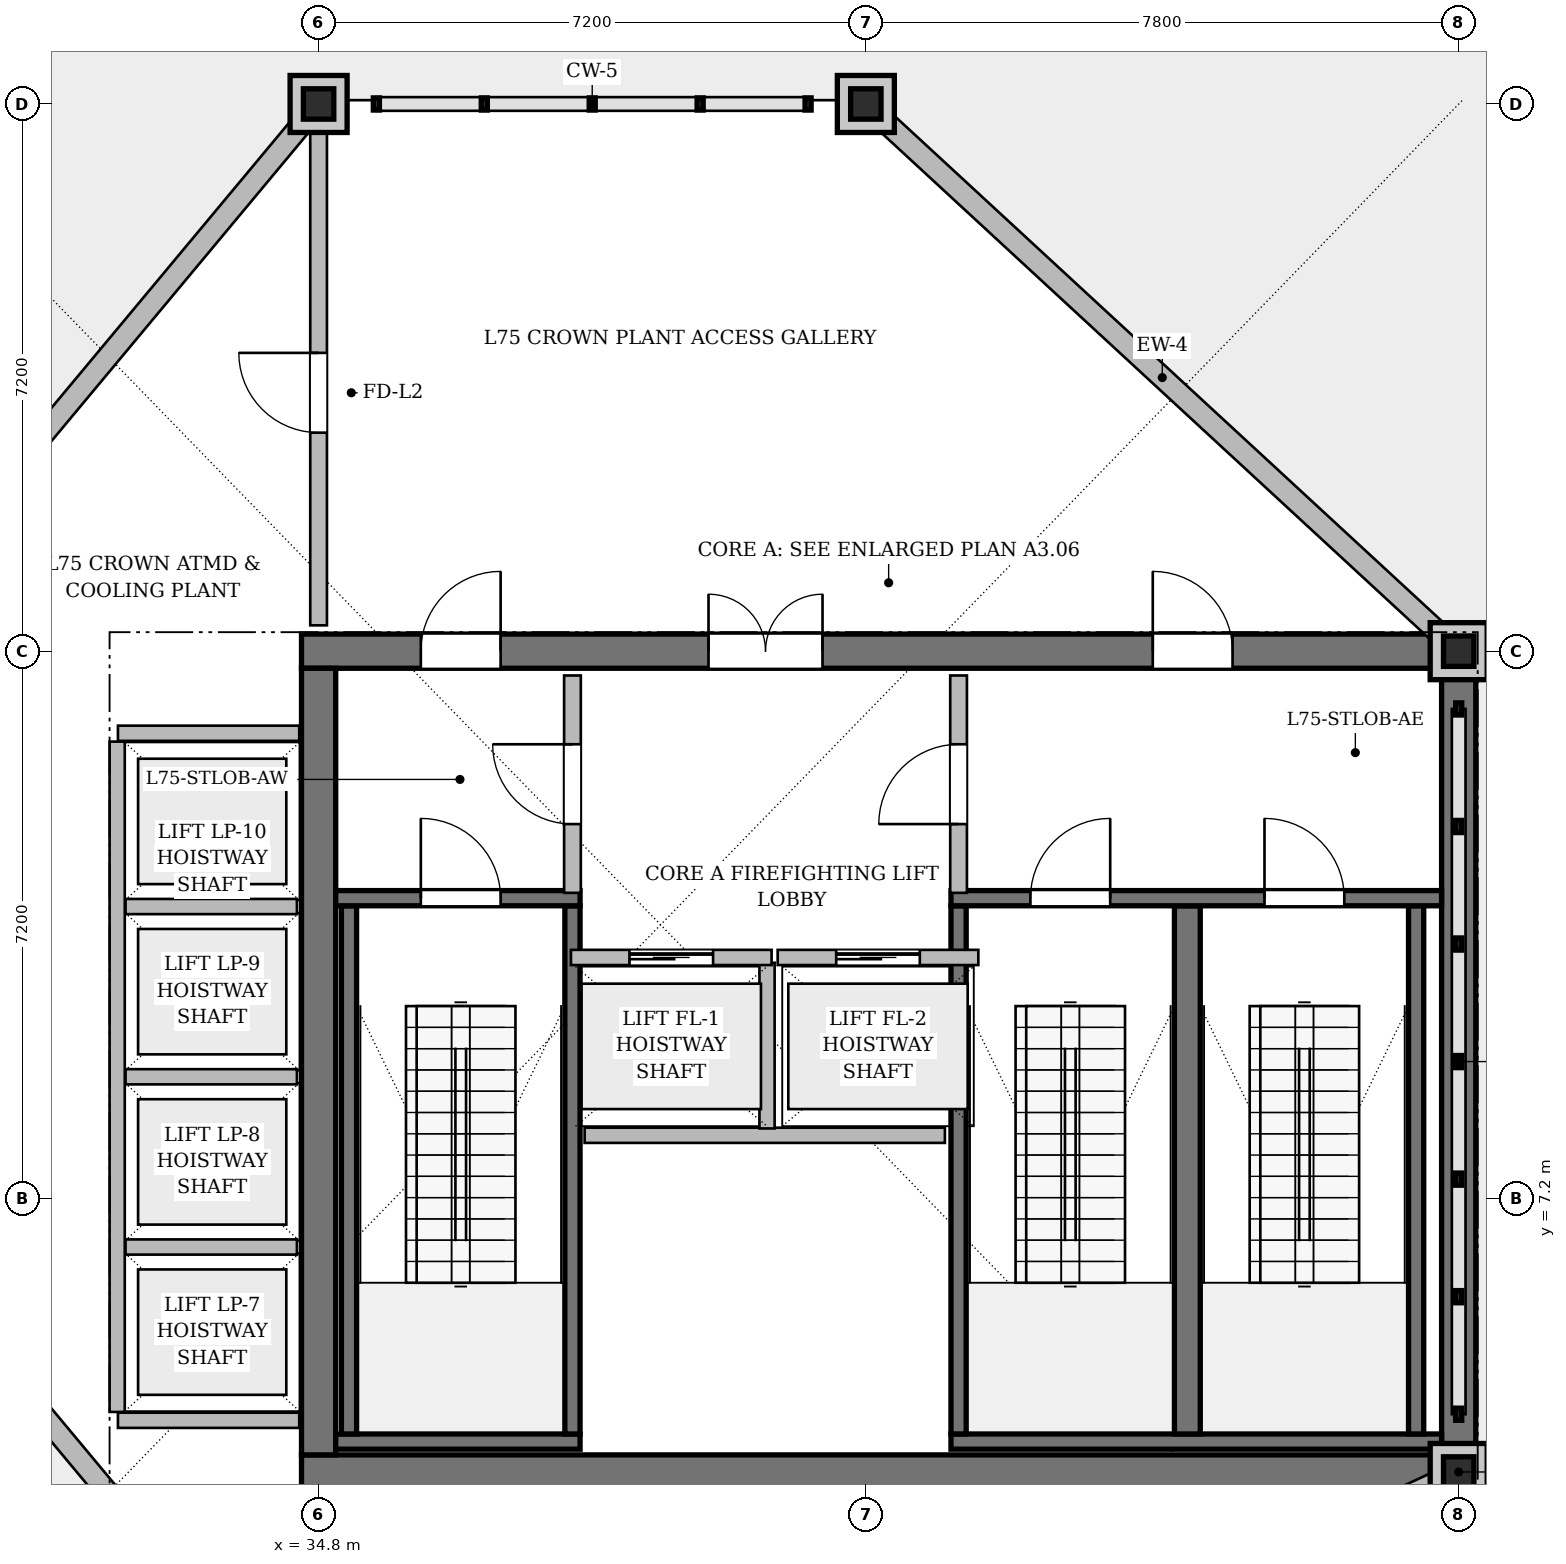
"""IFC4 building model, lengths in metres.
Left out: names, types, materials, properties, quantities, classifications, styles, units other than length and angle.
Written with IfcOpenShell. Run it as: python <this file> out.ifc"""

import sys

from ifc_helpers import new_model, si_unit, direction, frame, frame_2d, origin, origin_2d, place, context, subcontext, project, spatial, rectangle, hollow_rectangle, extrude, source, transform, mapped, element, fill, save


model = new_model("IFC4")
c1 = context("Model", 3, precision=1e-05, world=origin(), true_north=direction((0.0, 1.0)))
c2 = subcontext(c1, "Body", "Model", "MODEL_VIEW")
j1 = project(units=[si_unit("LENGTHUNIT", "METRE"), si_unit("PLANEANGLEUNIT", "RADIAN")], contexts=[c1])
p1 = place(None, origin())
s1 = spatial("IfcSite", under=j1, at=p1, CompositionType="ELEMENT")
p2 = place(p1, origin())
s2 = spatial("IfcBuilding", under=s1, at=p2, CompositionType="ELEMENT")
p3 = place(p2, frame((0.0, 0.0, 299.1)))
s3 = spatial("IfcBuildingStorey", under=s2, at=p3, CompositionType="ELEMENT", Elevation=299.1)
p4 = place(p3, frame((34.575, 3.6, 0.0), z_axis=(0.0, 0.0, 1.0), x_axis=(1.0, 0.0, 0.0)))
e1 = element("IfcWall", 1, at=p4, inside=s3, PredefinedType="SHEAR", context=c2, shape_type="SweptSolid", body=[
    extrude(rectangle(XDim=15.45, YDim=0.45, at=frame_2d((7.725, 0.0))), origin(), (0.0, 0.0, 1.0), 4.8),
])
p5 = place(p3, frame((34.575, 14.4, 0.0), z_axis=(0.0, 0.0, 1.0), x_axis=(1.0, 0.0, 0.0)))
e2 = element("IfcWall", 2, at=p5, inside=s3, PredefinedType="SHEAR", context=c2, shape_type="SweptSolid", body=[
    extrude(rectangle(XDim=15.45, YDim=0.45, at=frame_2d((7.725, 0.0))), origin(), (0.0, 0.0, 1.0), 4.8),
])
p6 = place(p5, frame((5.355, 0.0, 0.0)))
e3 = element("IfcOpeningElement", 3, at=p6, cuts=e2, PredefinedType="OPENING", context=c2, shape_type="SweptSolid", body=[
    extrude(rectangle(XDim=1.5, YDim=2.2, at=frame_2d((0.75, 1.1))), frame((0.0, 0.235, 0.0), z_axis=(0.0, -1.0, 0.0), x_axis=(1.0, 0.0, 0.0)), (0.0, 0.0, 1.0), 0.47),
])
p7 = place(p5, frame((1.57, 0.0, 0.0)))
e4 = element("IfcOpeningElement", 4, at=p7, cuts=e2, PredefinedType="OPENING", context=c2, shape_type="SweptSolid", body=[
    extrude(rectangle(XDim=1.05, YDim=2.15, at=frame_2d((0.525, 1.075))), frame((0.0, 0.235, 0.0), z_axis=(0.0, -1.0, 0.0), x_axis=(1.0, 0.0, 0.0)), (0.0, 0.0, 1.0), 0.47),
])
p8 = place(p5, frame((11.2, 0.0, 0.0)))
e5 = element("IfcOpeningElement", 5, at=p8, cuts=e2, PredefinedType="OPENING", context=c2, shape_type="SweptSolid", body=[
    extrude(rectangle(XDim=1.05, YDim=2.15, at=frame_2d((0.525, 1.075))), frame((0.0, 0.235, 0.0), z_axis=(0.0, -1.0, 0.0), x_axis=(1.0, 0.0, 0.0)), (0.0, 0.0, 1.0), 0.47),
])
for number, where, z_axis, x_axis in (
    (6, (34.8, 3.825, 0.0), (0.0, 0.0, 1.0), (0.0, 1.0, 0.0)),
    (7, (49.8, 3.825, 0.0), (0.0, 0.0, 1.0), (0.0, 1.0, 0.0)),
):
    element("IfcWall", number, at=place(p3, frame(where, z_axis=z_axis, x_axis=x_axis)), inside=s3, PredefinedType="SHEAR", context=c2, shape_type="SweptSolid", body=[
        extrude(rectangle(XDim=10.35, YDim=0.45, at=frame_2d((5.175, 0.0))), origin(), (0.0, 0.0, 1.0), 4.8),
    ])
m1 = source(origin(), c2, "Body", "SweptSolid", [
    extrude(hollow_rectangle(XDim=0.4, YDim=0.4, WallThickness=0.02, at=origin_2d()), origin(), (0.0, 0.0, 1.0), 4.8),
])
for number, where, z_axis, x_axis in (
    (8, (49.8, 3.6, 0.0), (0.0, 0.0, 1.0), (1.0, 0.0, 0.0)),
    (9, (49.8, 14.4, 0.0), (0.0, 0.0, 1.0), (1.0, 0.0, 0.0)),
    (10, (42.0, 21.6, 0.0), (0.0, 0.0, 1.0), (1.0, 0.0, 0.0)),
    (11, (34.8, 21.6, 0.0), (0.0, 0.0, 1.0), (1.0, 0.0, 0.0)),
):
    element("IfcColumn", number, at=place(p3, frame(where, z_axis=z_axis, x_axis=x_axis)), inside=s3, PredefinedType="COLUMN", context=c2, shape_type="MappedRepresentation", body=[
        mapped(m1, transform((0.0, 0.0, 0.0), scale=1.0)),
    ])
p9 = place(p3, frame((35.025, 4.0, 0.0), z_axis=(0.0, 0.0, 1.0), x_axis=(1.0, 0.0, 0.0)))
e12 = element("IfcWall", 12, at=p9, inside=s3, PredefinedType="SHEAR", context=c2, shape_type="SweptSolid", body=[
    extrude(rectangle(XDim=3.215, YDim=0.2, at=frame_2d((1.607, 0.0))), origin(), (0.0, 0.0, 1.0), 4.8),
])
for number, where, z_axis, x_axis in (
    (13, (35.2, 4.1, 0.0), (0.0, 0.0, 1.0), (0.0, 1.0, 0.0)),
    (14, (38.14, 4.1, 0.0), (0.0, 0.0, 1.0), (0.0, 1.0, 0.0)),
):
    element("IfcWall", number, at=place(p3, frame(where, z_axis=z_axis, x_axis=x_axis)), inside=s3, PredefinedType="SHEAR", context=c2, shape_type="SweptSolid", body=[
        extrude(rectangle(XDim=6.95, YDim=0.2, at=frame_2d((3.475, 0.0))), origin(), (0.0, 0.0, 1.0), 4.8),
    ])
p10 = place(p3, frame((35.025, 11.15, 0.0), z_axis=(0.0, 0.0, 1.0), x_axis=(1.0, 0.0, 0.0)))
e15 = element("IfcWall", 15, at=p10, inside=s3, PredefinedType="SHEAR", context=c2, shape_type="SweptSolid", body=[
    extrude(rectangle(XDim=3.215, YDim=0.2, at=frame_2d((1.607, 0.0))), origin(), (0.0, 0.0, 1.0), 4.8),
])
p11 = place(p10, frame((1.12, 0.0, 0.0)))
e16 = element("IfcOpeningElement", 16, at=p11, cuts=e15, PredefinedType="OPENING", context=c2, shape_type="SweptSolid", body=[
    extrude(rectangle(XDim=1.05, YDim=2.2, at=frame_2d((0.525, 1.1))), frame((0.0, 0.11, 0.0), z_axis=(0.0, -1.0, 0.0), x_axis=(1.0, 0.0, 0.0)), (0.0, 0.0, 1.0), 0.22),
])
p12 = place(p3, frame((43.12, 4.0, 0.0), z_axis=(0.0, 0.0, 1.0), x_axis=(1.0, 0.0, 0.0)))
e17 = element("IfcWall", 17, at=p12, inside=s3, PredefinedType="SHEAR", context=c2, shape_type="SweptSolid", body=[
    extrude(rectangle(XDim=6.455, YDim=0.2, at=frame_2d((3.228, 0.0))), origin(), (0.0, 0.0, 1.0), 4.8),
])
p13 = place(p3, frame((43.22, 4.1, 0.0), z_axis=(0.0, 0.0, 1.0), x_axis=(0.0, 1.0, 0.0)))
e18 = element("IfcWall", 18, at=p13, inside=s3, PredefinedType="SHEAR", context=c2, shape_type="SweptSolid", body=[
    extrude(rectangle(XDim=6.95, YDim=0.2, at=frame_2d((3.475, 0.0))), origin(), (0.0, 0.0, 1.0), 4.8),
])
p14 = place(p3, frame((46.23, 4.1, 0.0), z_axis=(0.0, 0.0, 1.0), x_axis=(0.0, 1.0, 0.0)))
e19 = element("IfcWall", 19, at=p14, inside=s3, PredefinedType="SHEAR", context=c2, shape_type="SweptSolid", body=[
    extrude(rectangle(XDim=6.95, YDim=0.34, at=frame_2d((3.475, 0.0))), origin(), (0.0, 0.0, 1.0), 4.8),
])
p15 = place(p3, frame((49.24, 4.1, 0.0), z_axis=(0.0, 0.0, 1.0), x_axis=(0.0, 1.0, 0.0)))
e20 = element("IfcWall", 20, at=p15, inside=s3, PredefinedType="SHEAR", context=c2, shape_type="SweptSolid", body=[
    extrude(rectangle(XDim=6.95, YDim=0.2, at=frame_2d((3.475, 0.0))), origin(), (0.0, 0.0, 1.0), 4.8),
])
p16 = place(p3, frame((43.12, 11.15, 0.0), z_axis=(0.0, 0.0, 1.0), x_axis=(1.0, 0.0, 0.0)))
e21 = element("IfcWall", 21, at=p16, inside=s3, PredefinedType="SHEAR", context=c2, shape_type="SweptSolid", body=[
    extrude(rectangle(XDim=6.455, YDim=0.2, at=frame_2d((3.228, 0.0))), origin(), (0.0, 0.0, 1.0), 4.8),
])
p17 = place(p16, frame((1.045, 0.0, 0.0)))
e22 = element("IfcOpeningElement", 22, at=p17, cuts=e21, PredefinedType="OPENING", context=c2, shape_type="SweptSolid", body=[
    extrude(rectangle(XDim=1.05, YDim=2.2, at=frame_2d((0.525, 1.1))), frame((0.0, 0.11, 0.0), z_axis=(0.0, -1.0, 0.0), x_axis=(1.0, 0.0, 0.0)), (0.0, 0.0, 1.0), 0.22),
])
p18 = place(p16, frame((4.125, 0.0, 0.0)))
e23 = element("IfcOpeningElement", 23, at=p18, cuts=e21, PredefinedType="OPENING", context=c2, shape_type="SweptSolid", body=[
    extrude(rectangle(XDim=1.05, YDim=2.2, at=frame_2d((0.525, 1.1))), frame((0.0, 0.11, 0.0), z_axis=(0.0, -1.0, 0.0), x_axis=(1.0, 0.0, 0.0)), (0.0, 0.0, 1.0), 0.22),
])
p19 = place(p3, frame((38.3, 8.03, 0.0), z_axis=(0.0, 0.0, 1.0), x_axis=(1.0, 0.0, 0.0)))
e24 = element("IfcWall", 24, at=p19, inside=s3, PredefinedType="PARTITIONING", context=c2, shape_type="SweptSolid", body=[
    extrude(rectangle(XDim=4.74, YDim=0.2, at=frame_2d((2.37, 0.0))), origin(), (0.0, 0.0, 1.0), 4.5),
])
p20 = place(p3, frame((40.7, 8.12, 0.0), z_axis=(0.0, 0.0, 1.0), x_axis=(0.0, 1.0, 0.0)))
e25 = element("IfcWall", 25, at=p20, inside=s3, PredefinedType="PARTITIONING", context=c2, shape_type="SweptSolid", body=[
    extrude(rectangle(XDim=2.18, YDim=0.2, at=frame_2d((1.09, 0.0))), origin(), (0.0, 0.0, 1.0), 4.5),
])
p21 = place(p3, frame((38.14, 11.22, 0.0), z_axis=(0.0, 0.0, 1.0), x_axis=(0.0, 1.0, 0.0)))
e26 = element("IfcWall", 26, at=p21, inside=s3, PredefinedType="PARTITIONING", context=c2, shape_type="SweptSolid", body=[
    extrude(rectangle(XDim=2.86, YDim=0.22, at=frame_2d((1.43, 0.0))), origin(), (0.0, 0.0, 1.0), 4.5),
])
p22 = place(p21, frame((0.905, 0.0, 0.0)))
e27 = element("IfcOpeningElement", 27, at=p22, cuts=e26, PredefinedType="OPENING", context=c2, shape_type="SweptSolid", body=[
    extrude(rectangle(XDim=1.05, YDim=2.15, at=frame_2d((0.525, 1.075))), frame((0.0, 0.12, 0.0), z_axis=(0.0, -1.0, 0.0), x_axis=(1.0, 0.0, 0.0)), (0.0, 0.0, 1.0), 0.24),
])
p23 = place(p3, frame((43.22, 11.22, 0.0), z_axis=(0.0, 0.0, 1.0), x_axis=(0.0, 1.0, 0.0)))
e28 = element("IfcWall", 28, at=p23, inside=s3, PredefinedType="PARTITIONING", context=c2, shape_type="SweptSolid", body=[
    extrude(rectangle(XDim=2.86, YDim=0.22, at=frame_2d((1.43, 0.0))), origin(), (0.0, 0.0, 1.0), 4.5),
])
p24 = place(p23, frame((0.905, 0.0, 0.0)))
e29 = element("IfcOpeningElement", 29, at=p24, cuts=e28, PredefinedType="OPENING", context=c2, shape_type="SweptSolid", body=[
    extrude(rectangle(XDim=1.05, YDim=2.15, at=frame_2d((0.525, 1.075))), frame((0.0, 0.12, 0.0), z_axis=(0.0, -1.0, 0.0), x_axis=(1.0, 0.0, 0.0)), (0.0, 0.0, 1.0), 0.24),
])
for number, where, z_axis, x_axis in (
    (30, (32.16, 4.28, 0.0), (0.0, 0.0, 1.0), (1.0, 0.0, 0.0)),
    (31, (32.16, 13.32, 0.0), (0.0, 0.0, 1.0), (1.0, 0.0, 0.0)),
):
    element("IfcWall", number, at=place(p3, frame(where, z_axis=z_axis, x_axis=x_axis)), inside=s3, PredefinedType="PARTITIONING", context=c2, shape_type="SweptSolid", body=[
        extrude(rectangle(XDim=2.385, YDim=0.2, at=frame_2d((1.192, 0.0))), origin(), (0.0, 0.0, 1.0), 4.5),
    ])
p25 = place(p3, frame((32.15, 4.39, 0.0), z_axis=(0.0, 0.0, 1.0), x_axis=(0.0, 1.0, 0.0)))
e32 = element("IfcWall", 32, at=p25, inside=s3, PredefinedType="PARTITIONING", context=c2, shape_type="SweptSolid", body=[
    extrude(rectangle(XDim=8.82, YDim=0.2, at=frame_2d((4.41, 0.0))), origin(), (0.0, 0.0, 1.0), 4.5),
])
for number, where, z_axis, x_axis in (
    (33, (32.26, 6.56, 0.0), (0.0, 0.0, 1.0), (1.0, 0.0, 0.0)),
    (34, (32.26, 8.8, 0.0), (0.0, 0.0, 1.0), (1.0, 0.0, 0.0)),
    (35, (32.26, 11.04, 0.0), (0.0, 0.0, 1.0), (1.0, 0.0, 0.0)),
):
    element("IfcWall", number, at=place(p3, frame(where, z_axis=z_axis, x_axis=x_axis)), inside=s3, PredefinedType="PARTITIONING", context=c2, shape_type="SweptSolid", body=[
        extrude(rectangle(XDim=2.255, YDim=0.2, at=frame_2d((1.127, 0.0))), origin(), (0.0, 0.0, 1.0), 4.5),
    ])
p26 = place(p3, frame((34.8, 14.74, 0.0), z_axis=(0.0, 0.0, 1.0), x_axis=(0.0, 1.0, 0.0)))
e36 = element("IfcWall", 36, at=p26, inside=s3, PredefinedType="PARTITIONING", context=c2, shape_type="SweptSolid", body=[
    extrude(rectangle(XDim=6.72, YDim=0.22, at=frame_2d((3.36, 0.0))), origin(), (0.0, 0.0, 1.0), 4.035),
])
p27 = place(p26, frame((2.535, 0.0, 0.0)))
e37 = element("IfcOpeningElement", 37, at=p27, cuts=e36, PredefinedType="OPENING", context=c2, shape_type="SweptSolid", body=[
    extrude(rectangle(XDim=1.05, YDim=2.15, at=frame_2d((0.525, 1.075))), frame((0.0, 0.12, 0.0), z_axis=(0.0, -1.0, 0.0), x_axis=(1.0, 0.0, 0.0)), (0.0, 0.0, 1.0), 0.24),
])
p28 = place(p3, frame((38.12, 10.37, 0.0), z_axis=(0.0, 0.0, 1.0), x_axis=(1.0, 0.0, 0.0)))
e38 = element("IfcWall", 38, at=p28, inside=s3, PredefinedType="PARTITIONING", context=c2, shape_type="SweptSolid", body=[
    extrude(rectangle(XDim=2.64, YDim=0.2, at=frame_2d((1.32, 0.0))), origin(), (0.0, 0.0, 1.0), 4.5),
])
p29 = place(p28, frame((0.77, 0.0, 0.0)))
e39 = element("IfcOpeningElement", 39, at=p29, cuts=e38, PredefinedType="OPENING", context=c2, shape_type="SweptSolid", body=[
    extrude(rectangle(XDim=1.1, YDim=2.2, at=frame_2d((0.55, 1.1))), frame((0.0, 0.11, 0.0), z_axis=(0.0, -1.0, 0.0), x_axis=(1.0, 0.0, 0.0)), (0.0, 0.0, 1.0), 0.22),
])
p30 = place(p3, frame((40.84, 10.37, 0.0), z_axis=(0.0, 0.0, 1.0), x_axis=(1.0, 0.0, 0.0)))
e40 = element("IfcWall", 40, at=p30, inside=s3, PredefinedType="PARTITIONING", context=c2, shape_type="SweptSolid", body=[
    extrude(rectangle(XDim=2.64, YDim=0.2, at=frame_2d((1.32, 0.0))), origin(), (0.0, 0.0, 1.0), 4.5),
])
p31 = place(p30, frame((0.77, 0.0, 0.0)))
e41 = element("IfcOpeningElement", 41, at=p31, cuts=e40, PredefinedType="OPENING", context=c2, shape_type="SweptSolid", body=[
    extrude(rectangle(XDim=1.1, YDim=2.2, at=frame_2d((0.55, 1.1))), frame((0.0, 0.11, 0.0), z_axis=(0.0, -1.0, 0.0), x_axis=(1.0, 0.0, 0.0)), (0.0, 0.0, 1.0), 0.22),
])
p32 = place(p3, frame((42.0, 0.0, 0.0), z_axis=(0.0, 0.0, 1.0), x_axis=(0.907956057379, 0.41906538615, 0.0)))
e42 = element("IfcWall", 42, at=p32, inside=s3, PredefinedType="SOLIDWALL", context=c2, shape_type="SweptSolid", body=[
    extrude(rectangle(XDim=8.591, YDim=0.28, at=frame_2d((4.295, 0.0))), origin(), (0.0, 0.0, 1.0), 4.125),
])
p33 = place(p3, frame((49.8, 14.4, 0.0), z_axis=(0.0, 0.0, 1.0), x_axis=(-0.734796390569, 0.678287744551, 0.0)))
e43 = element("IfcWall", 43, at=p33, inside=s3, PredefinedType="SOLIDWALL", context=c2, shape_type="SweptSolid", body=[
    extrude(rectangle(XDim=10.615, YDim=0.28, at=frame_2d((5.308, 0.0))), origin(), (0.0, 0.0, 1.0), 4.125),
])
p34 = place(p3, frame((34.8, 21.6, 0.0), z_axis=(0.0, 0.0, 1.0), x_axis=(-0.640174150918, -0.768229820104, 0.0)))
e44 = element("IfcWall", 44, at=p34, inside=s3, PredefinedType="SOLIDWALL", context=c2, shape_type="SweptSolid", body=[
    extrude(rectangle(XDim=9.373, YDim=0.28, at=frame_2d((4.686, 0.0))), origin(), (0.0, 0.0, 1.0), 4.125),
])
p35 = place(p3, frame((28.8, 7.2, 0.0), z_axis=(0.0, 0.0, 1.0), x_axis=(0.640186961885, -0.768219144407, 0.0)))
e45 = element("IfcWall", 45, at=p35, inside=s3, PredefinedType="SOLIDWALL", context=c2, shape_type="SweptSolid", body=[
    extrude(rectangle(XDim=9.372, YDim=0.28, at=frame_2d((4.686, 0.0))), origin(), (0.0, 0.0, 1.0), 4.125),
])
m2 = source(origin(), c2, "Body", "SweptSolid", [
    extrude(rectangle(XDim=1.05, YDim=2.2, at=frame_2d((0.525, 1.1))), frame((0.0, 0.025, 0.0), z_axis=(0.0, -1.0, 0.0), x_axis=(1.0, 0.0, 0.0)), (0.0, 0.0, 1.0), 0.05),
])
p36 = place(p11, origin())
e46 = element("IfcDoor", 46, at=p36, inside=s3, OperationType="SINGLE_SWING_LEFT", PredefinedType="DOOR", context=c2, shape_type="MappedRepresentation", body=[
    mapped(m2, transform((0.0, 0.0, 0.0), scale=1.0)),
])
fill(e16, e46)
p37 = place(p17, origin())
e47 = element("IfcDoor", 47, at=p37, inside=s3, OperationType="SINGLE_SWING_RIGHT", PredefinedType="DOOR", context=c2, shape_type="MappedRepresentation", body=[
    mapped(m2, transform((0.0, 0.0, 0.0), scale=1.0)),
])
fill(e22, e47)
p38 = place(p18, origin())
e48 = element("IfcDoor", 48, at=p38, inside=s3, OperationType="SINGLE_SWING_LEFT", PredefinedType="DOOR", context=c2, shape_type="MappedRepresentation", body=[
    mapped(m2, transform((0.0, 0.0, 0.0), scale=1.0)),
])
fill(e23, e48)
m3 = source(origin(), c2, "Body", "SweptSolid", [
    extrude(rectangle(XDim=1.05, YDim=2.15, at=frame_2d((0.525, 1.075))), frame((0.0, 0.025, 0.0), z_axis=(0.0, -1.0, 0.0), x_axis=(1.0, 0.0, 0.0)), (0.0, 0.0, 1.0), 0.05),
])
p39 = place(p22, origin())
e49 = element("IfcDoor", 49, at=p39, inside=s3, OperationType="SINGLE_SWING_RIGHT", PredefinedType="DOOR", context=c2, shape_type="MappedRepresentation", body=[
    mapped(m3, transform((0.0, 0.0, 0.0), scale=1.0)),
])
fill(e27, e49)
p40 = place(p24, origin())
e50 = element("IfcDoor", 50, at=p40, inside=s3, OperationType="SINGLE_SWING_LEFT", PredefinedType="DOOR", context=c2, shape_type="MappedRepresentation", body=[
    mapped(m3, transform((0.0, 0.0, 0.0), scale=1.0)),
])
fill(e29, e50)
m4 = source(origin(), c2, "Body", "SweptSolid", [
    extrude(rectangle(XDim=1.5, YDim=2.2, at=frame_2d((0.75, 1.1))), frame((0.0, 0.025, 0.0), z_axis=(0.0, -1.0, 0.0), x_axis=(1.0, 0.0, 0.0)), (0.0, 0.0, 1.0), 0.05),
])
p41 = place(p6, origin())
e51 = element("IfcDoor", 51, at=p41, inside=s3, OperationType="DOUBLE_DOOR_SINGLE_SWING", PredefinedType="DOOR", context=c2, shape_type="MappedRepresentation", body=[
    mapped(m4, transform((0.0, 0.0, 0.0), scale=1.0)),
])
fill(e3, e51)
p42 = place(p7, origin())
e52 = element("IfcDoor", 52, at=p42, inside=s3, OperationType="SINGLE_SWING_RIGHT", PredefinedType="DOOR", context=c2, shape_type="MappedRepresentation", body=[
    mapped(m3, transform((0.0, 0.0, 0.0), scale=1.0)),
])
fill(e4, e52)
p43 = place(p8, origin())
e53 = element("IfcDoor", 53, at=p43, inside=s3, OperationType="SINGLE_SWING_LEFT", PredefinedType="DOOR", context=c2, shape_type="MappedRepresentation", body=[
    mapped(m3, transform((0.0, 0.0, 0.0), scale=1.0)),
])
fill(e5, e53)
p44 = place(p27, origin())
e54 = element("IfcDoor", 54, at=p44, inside=s3, OperationType="SINGLE_SWING_RIGHT", PredefinedType="DOOR", context=c2, shape_type="MappedRepresentation", body=[
    mapped(m3, transform((0.0, 0.0, 0.0), scale=1.0)),
])
fill(e37, e54)
m5 = source(origin(), c2, "Body", "SweptSolid", [
    extrude(rectangle(XDim=1.1, YDim=2.2, at=frame_2d((0.55, 1.1))), frame((0.0, 0.025, 0.0), z_axis=(0.0, -1.0, 0.0), x_axis=(1.0, 0.0, 0.0)), (0.0, 0.0, 1.0), 0.05),
])
p45 = place(p29, origin())
e55 = element("IfcDoor", 55, at=p45, inside=s3, OperationType="SLIDING_TO_LEFT", PredefinedType="DOOR", context=c2, shape_type="MappedRepresentation", body=[
    mapped(m5, transform((0.0, 0.0, 0.0), scale=1.0)),
])
fill(e39, e55)
p46 = place(p31, origin())
e56 = element("IfcDoor", 56, at=p46, inside=s3, OperationType="SLIDING_TO_LEFT", PredefinedType="DOOR", context=c2, shape_type="MappedRepresentation", body=[
    mapped(m5, transform((0.0, 0.0, 0.0), scale=1.0)),
])
fill(e41, e56)
save(model, sys.argv[1])
